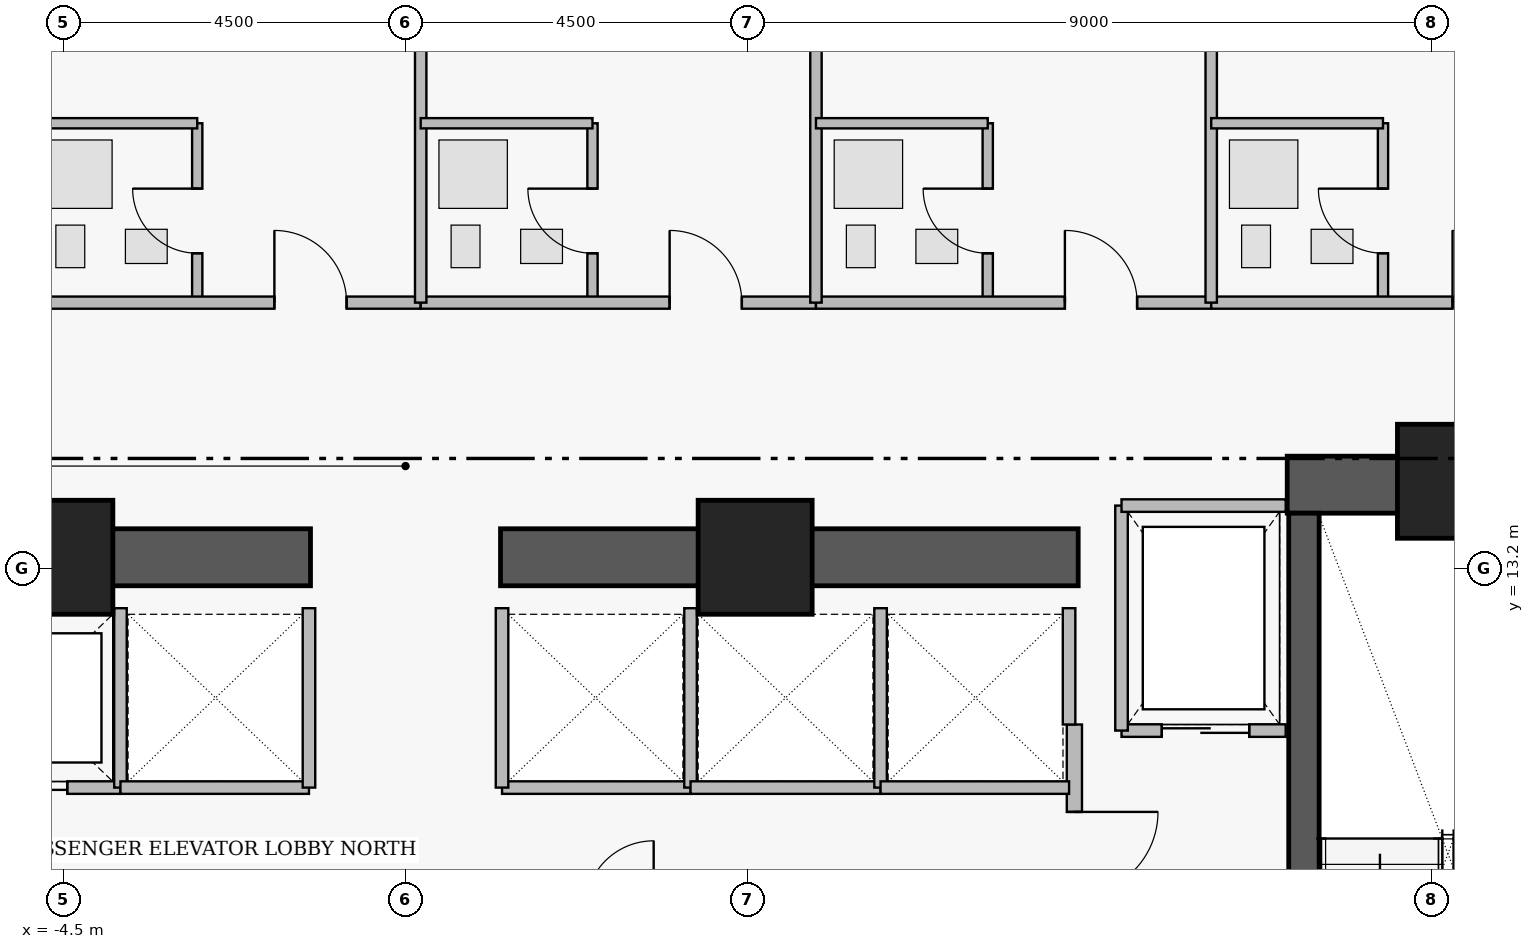
"""IFC4 building model, lengths in metres.
Left out: names, types, materials, properties, quantities, classifications, styles, units other than length and angle.
Written with IfcOpenShell. Run it as: python <this file> out.ifc"""

import sys

from ifc_helpers import new_model, si_unit, direction, frame, frame_2d, origin, origin_2d, place, context, subcontext, project, spatial, rectangle, extrude, element, fill, save


model = new_model("IFC4")
c1 = context("Model", 3, precision=1e-05, world=origin(), true_north=direction((0.0, 1.0)))
c2 = subcontext(c1, "Body", "Model", "MODEL_VIEW")
j1 = project(units=[si_unit("LENGTHUNIT", "METRE"), si_unit("PLANEANGLEUNIT", "RADIAN")], contexts=[c1])
p1 = place(None, origin())
s1 = spatial("IfcSite", under=j1, at=p1, CompositionType="ELEMENT")
p2 = place(p1, origin())
s2 = spatial("IfcBuilding", under=s1, at=p2, CompositionType="ELEMENT")
p3 = place(p2, frame((0.0, 0.0, 106.6)))
s3 = spatial("IfcBuildingStorey", under=s2, at=p3, CompositionType="ELEMENT", Elevation=106.6)
p4 = place(p3, frame((11.6, 14.305, 0.0), z_axis=(0.0, 0.0, 1.0), x_axis=(1.0, 0.0, 0.0)))
e1 = element("IfcWall", 1, at=p4, inside=s3, PredefinedType="SHEAR", context=c2, shape_type="SweptSolid", body=[
    extrude(rectangle(XDim=4.56, YDim=0.75, at=frame_2d((2.28, 0.0))), origin(), (0.0, 0.0, 1.0), 3.46),
])
for number, where, z_axis, x_axis in (
    (2, (-8.85, 13.35, 0.0), (0.0, 0.0, 1.0), (1.0, 0.0, 0.0)),
    (3, (1.25, 13.35, 0.0), (0.0, 0.0, 1.0), (1.0, 0.0, 0.0)),
):
    element("IfcWall", number, at=place(p3, frame(where, z_axis=z_axis, x_axis=x_axis)), inside=s3, PredefinedType="SHEAR", context=c2, shape_type="SweptSolid", body=[
        extrude(rectangle(XDim=7.6, YDim=0.75, at=frame_2d((3.8, 0.0))), origin(), (0.0, 0.0, 1.0), 3.43),
    ])
p5 = place(p3, frame((11.82, 13.93, 0.0), z_axis=(0.0, 0.0, 1.0), x_axis=(0.0, -1.0, 0.0)))
e4 = element("IfcWall", 4, at=p5, inside=s3, PredefinedType="SHEAR", context=c2, shape_type="SweptSolid", body=[
    extrude(rectangle(XDim=8.96, YDim=0.4, at=frame_2d((4.48, 0.0))), origin(), (0.0, 0.0, 1.0), 3.46),
])
p6 = place(p5, frame((7.53, 0.0, 0.0)))
e5 = element("IfcOpeningElement", 5, at=p6, cuts=e4, PredefinedType="OPENING", context=c2, shape_type="SweptSolid", body=[
    extrude(rectangle(XDim=1.12, YDim=2.22, at=frame_2d((0.56, 1.11))), frame((0.0, 0.21, 0.0), z_axis=(0.0, -1.0, 0.0), x_axis=(1.0, 0.0, 0.0)), (0.0, 0.0, 1.0), 0.42),
])
for number, where, z_axis, x_axis in (
    (6, (-4.6, 13.35, 0.0), (0.0, 0.0, 1.0), (1.0, 0.0, 0.0)),
    (7, (4.6, 13.35, 0.0), (0.0, 0.0, 1.0), (1.0, 0.0, 0.0)),
    (8, (13.8, 14.35, 0.0), (0.0, 0.0, 1.0), (1.0, 0.0, 0.0)),
):
    element("IfcColumn", number, at=place(p3, frame(where, z_axis=z_axis, x_axis=x_axis)), inside=s3, PredefinedType="COLUMN", context=c2, shape_type="SweptSolid", body=[
        extrude(rectangle(XDim=1.5, YDim=1.5, at=origin_2d()), origin(), (0.0, 0.0, 1.0), 3.65),
    ])
p7 = place(p3, frame((8.8, 11.15, 0.0), z_axis=(0.0, 0.0, 1.0), x_axis=(0.0, -1.0, 0.0)))
e9 = element("IfcWall", 9, at=p7, inside=s3, PredefinedType="PARTITIONING", context=c2, shape_type="SweptSolid", body=[
    extrude(rectangle(XDim=6.1, YDim=0.2, at=frame_2d((3.05, 0.0))), origin(), (0.0, 0.0, 1.0), 3.43),
])
p8 = place(p7, frame((1.15, 0.0, 0.0)))
e10 = element("IfcOpeningElement", 10, at=p8, cuts=e9, PredefinedType="OPENING", context=c2, shape_type="SweptSolid", body=[
    extrude(rectangle(XDim=1.1, YDim=2.2, at=frame_2d((0.55, 1.1))), frame((0.0, 0.11, 0.0), z_axis=(0.0, -1.0, 0.0), x_axis=(1.0, 0.0, 0.0)), (0.0, 0.0, 1.0), 0.22),
])
p9 = place(p7, frame((4.75, 0.0, 0.0)))
e11 = element("IfcOpeningElement", 11, at=p9, cuts=e9, PredefinedType="OPENING", context=c2, shape_type="SweptSolid", body=[
    extrude(rectangle(XDim=1.1, YDim=2.2, at=frame_2d((0.55, 1.1))), frame((0.0, 0.11, 0.0), z_axis=(0.0, -1.0, 0.0), x_axis=(1.0, 0.0, 0.0)), (0.0, 0.0, 1.0), 0.22),
])
p10 = place(p3, frame((9.42, 11.07, 0.0), z_axis=(0.0, 0.0, 1.0), x_axis=(1.0, 0.0, 0.0)))
e12 = element("IfcWall", 12, at=p10, inside=s3, PredefinedType="PARTITIONING", context=c2, shape_type="SweptSolid", body=[
    extrude(rectangle(XDim=2.16, YDim=0.165, at=frame_2d((1.08, 0.0))), origin(), (0.0, 0.0, 1.0), 3.43),
])
p11 = place(p10, frame((0.53, 0.0, 0.0)))
e13 = element("IfcOpeningElement", 13, at=p11, cuts=e12, PredefinedType="OPENING", context=c2, shape_type="SweptSolid", body=[
    extrude(rectangle(XDim=1.15, YDim=2.25, at=frame_2d((0.575, 1.125))), frame((0.0, 0.093, 0.0), z_axis=(0.0, -1.0, 0.0), x_axis=(1.0, 0.0, 0.0)), (0.0, 0.0, 1.0), 0.185),
])
p12 = place(p3, frame((-6.25, 10.32, 0.0), z_axis=(0.0, 0.0, 1.0), x_axis=(1.0, 0.0, 0.0)))
e14 = element("IfcWall", 14, at=p12, inside=s3, PredefinedType="PARTITIONING", context=c2, shape_type="SweptSolid", body=[
    extrude(rectangle(XDim=2.5, YDim=0.165, at=frame_2d((1.25, 0.0))), origin(), (0.0, 0.0, 1.0), 3.43),
])
p13 = place(p12, frame((0.7, 0.0, 0.0)))
e15 = element("IfcOpeningElement", 15, at=p13, cuts=e14, PredefinedType="OPENING", context=c2, shape_type="SweptSolid", body=[
    extrude(rectangle(XDim=1.1, YDim=2.25, at=frame_2d((0.55, 1.125))), frame((0.0, 0.093, 0.0), z_axis=(0.0, -1.0, 0.0), x_axis=(1.0, 0.0, 0.0)), (0.0, 0.0, 1.0), 0.185),
])
p14 = place(p3, frame((-2.74, 16.7, 0.0), z_axis=(0.0, 0.0, 1.0), x_axis=(0.0, 1.0, 0.0)))
e16 = element("IfcWall", 16, at=p14, inside=s3, PredefinedType="PLUMBINGWALL", context=c2, shape_type="SweptSolid", body=[
    extrude(rectangle(XDim=2.36, YDim=0.135, at=frame_2d((1.18, 0.0))), origin(), (0.0, 0.0, 1.0), 3.43),
])
p15 = place(p14, frame((0.65, 0.0, 0.0)))
e17 = element("IfcOpeningElement", 17, at=p15, cuts=e16, PredefinedType="OPENING", context=c2, shape_type="SweptSolid", body=[
    extrude(rectangle(XDim=0.85, YDim=2.1, at=frame_2d((0.425, 1.05))), frame((0.0, 0.077, 0.0), z_axis=(0.0, -1.0, 0.0), x_axis=(1.0, 0.0, 0.0)), (0.0, 0.0, 1.0), 0.155),
])
p16 = place(p3, frame((-5.0, 16.7, 0.0), z_axis=(0.0, 0.0, 1.0), x_axis=(1.0, 0.0, 0.0)))
e18 = element("IfcWall", 18, at=p16, inside=s3, PredefinedType="PARTITIONING", context=c2, shape_type="SweptSolid", body=[
    extrude(rectangle(XDim=5.2, YDim=0.16, at=frame_2d((2.6, 0.0))), origin(), (0.0, 0.0, 1.0), 2.973),
])
p17 = place(p16, frame((3.275, 0.0, 0.0)))
e19 = element("IfcOpeningElement", 19, at=p17, cuts=e18, PredefinedType="OPENING", context=c2, shape_type="SweptSolid", body=[
    extrude(rectangle(XDim=0.95, YDim=2.15, at=frame_2d((0.475, 1.075))), frame((0.0, 0.09, 0.0), z_axis=(0.0, -1.0, 0.0), x_axis=(1.0, 0.0, 0.0)), (0.0, 0.0, 1.0), 0.18),
])
p18 = place(p3, frame((2.46, 16.7, 0.0), z_axis=(0.0, 0.0, 1.0), x_axis=(0.0, 1.0, 0.0)))
e20 = element("IfcWall", 20, at=p18, inside=s3, PredefinedType="PLUMBINGWALL", context=c2, shape_type="SweptSolid", body=[
    extrude(rectangle(XDim=2.36, YDim=0.135, at=frame_2d((1.18, 0.0))), origin(), (0.0, 0.0, 1.0), 3.43),
])
p19 = place(p18, frame((0.65, 0.0, 0.0)))
e21 = element("IfcOpeningElement", 21, at=p19, cuts=e20, PredefinedType="OPENING", context=c2, shape_type="SweptSolid", body=[
    extrude(rectangle(XDim=0.85, YDim=2.1, at=frame_2d((0.425, 1.05))), frame((0.0, 0.077, 0.0), z_axis=(0.0, -1.0, 0.0), x_axis=(1.0, 0.0, 0.0)), (0.0, 0.0, 1.0), 0.155),
])
p20 = place(p3, frame((0.2, 16.7, 0.0), z_axis=(0.0, 0.0, 1.0), x_axis=(1.0, 0.0, 0.0)))
e22 = element("IfcWall", 22, at=p20, inside=s3, PredefinedType="PARTITIONING", context=c2, shape_type="SweptSolid", body=[
    extrude(rectangle(XDim=5.2, YDim=0.16, at=frame_2d((2.6, 0.0))), origin(), (0.0, 0.0, 1.0), 2.973),
])
p21 = place(p20, frame((3.275, 0.0, 0.0)))
e23 = element("IfcOpeningElement", 23, at=p21, cuts=e22, PredefinedType="OPENING", context=c2, shape_type="SweptSolid", body=[
    extrude(rectangle(XDim=0.95, YDim=2.15, at=frame_2d((0.475, 1.075))), frame((0.0, 0.09, 0.0), z_axis=(0.0, -1.0, 0.0), x_axis=(1.0, 0.0, 0.0)), (0.0, 0.0, 1.0), 0.18),
])
p22 = place(p3, frame((7.66, 16.7, 0.0), z_axis=(0.0, 0.0, 1.0), x_axis=(0.0, 1.0, 0.0)))
e24 = element("IfcWall", 24, at=p22, inside=s3, PredefinedType="PLUMBINGWALL", context=c2, shape_type="SweptSolid", body=[
    extrude(rectangle(XDim=2.36, YDim=0.135, at=frame_2d((1.18, 0.0))), origin(), (0.0, 0.0, 1.0), 3.43),
])
p23 = place(p22, frame((0.65, 0.0, 0.0)))
e25 = element("IfcOpeningElement", 25, at=p23, cuts=e24, PredefinedType="OPENING", context=c2, shape_type="SweptSolid", body=[
    extrude(rectangle(XDim=0.85, YDim=2.1, at=frame_2d((0.425, 1.05))), frame((0.0, 0.077, 0.0), z_axis=(0.0, -1.0, 0.0), x_axis=(1.0, 0.0, 0.0)), (0.0, 0.0, 1.0), 0.155),
])
p24 = place(p3, frame((5.4, 16.7, 0.0), z_axis=(0.0, 0.0, 1.0), x_axis=(1.0, 0.0, 0.0)))
e26 = element("IfcWall", 26, at=p24, inside=s3, PredefinedType="PARTITIONING", context=c2, shape_type="SweptSolid", body=[
    extrude(rectangle(XDim=5.2, YDim=0.16, at=frame_2d((2.6, 0.0))), origin(), (0.0, 0.0, 1.0), 2.973),
])
p25 = place(p24, frame((3.275, 0.0, 0.0)))
e27 = element("IfcOpeningElement", 27, at=p25, cuts=e26, PredefinedType="OPENING", context=c2, shape_type="SweptSolid", body=[
    extrude(rectangle(XDim=0.95, YDim=2.15, at=frame_2d((0.475, 1.075))), frame((0.0, 0.09, 0.0), z_axis=(0.0, -1.0, 0.0), x_axis=(1.0, 0.0, 0.0)), (0.0, 0.0, 1.0), 0.18),
])
p26 = place(p3, frame((12.86, 16.7, 0.0), z_axis=(0.0, 0.0, 1.0), x_axis=(0.0, 1.0, 0.0)))
e28 = element("IfcWall", 28, at=p26, inside=s3, PredefinedType="PLUMBINGWALL", context=c2, shape_type="SweptSolid", body=[
    extrude(rectangle(XDim=2.36, YDim=0.135, at=frame_2d((1.18, 0.0))), origin(), (0.0, 0.0, 1.0), 3.43),
])
p27 = place(p26, frame((0.65, 0.0, 0.0)))
e29 = element("IfcOpeningElement", 29, at=p27, cuts=e28, PredefinedType="OPENING", context=c2, shape_type="SweptSolid", body=[
    extrude(rectangle(XDim=0.85, YDim=2.1, at=frame_2d((0.425, 1.05))), frame((0.0, 0.077, 0.0), z_axis=(0.0, -1.0, 0.0), x_axis=(1.0, 0.0, 0.0)), (0.0, 0.0, 1.0), 0.155),
])
p28 = place(p3, frame((10.6, 16.7, 0.0), z_axis=(0.0, 0.0, 1.0), x_axis=(1.0, 0.0, 0.0)))
e30 = element("IfcWall", 30, at=p28, inside=s3, PredefinedType="PARTITIONING", context=c2, shape_type="SweptSolid", body=[
    extrude(rectangle(XDim=5.0, YDim=0.16, at=frame_2d((2.5, 0.0))), origin(), (0.0, 0.0, 1.0), 2.973),
])
p29 = place(p28, frame((3.175, 0.0, 0.0)))
e31 = element("IfcOpeningElement", 31, at=p29, cuts=e30, PredefinedType="OPENING", context=c2, shape_type="SweptSolid", body=[
    extrude(rectangle(XDim=0.95, YDim=2.15, at=frame_2d((0.475, 1.075))), frame((0.0, 0.09, 0.0), z_axis=(0.0, -1.0, 0.0), x_axis=(1.0, 0.0, 0.0)), (0.0, 0.0, 1.0), 0.18),
])
p30 = place(p3, frame((9.42, 11.07, 0.0), z_axis=(0.0, 0.0, 1.0), x_axis=(0.0, 1.0, 0.0)))
e32 = element("IfcWall", 32, at=p30, inside=s3, PredefinedType="PARTITIONING", context=c2, shape_type="SweptSolid", body=[
    extrude(rectangle(XDim=2.96, YDim=0.165, at=frame_2d((1.48, 0.0))), origin(), (0.0, 0.0, 1.0), 3.43),
])
p31 = place(p3, frame((9.42, 14.03, 0.0), z_axis=(0.0, 0.0, 1.0), x_axis=(1.0, 0.0, 0.0)))
e33 = element("IfcWall", 33, at=p31, inside=s3, PredefinedType="PARTITIONING", context=c2, shape_type="SweptSolid", body=[
    extrude(rectangle(XDim=2.16, YDim=0.165, at=frame_2d((1.08, 0.0))), origin(), (0.0, 0.0, 1.0), 3.43),
])
p32 = place(p3, frame((-3.75, 10.32, 0.0), z_axis=(0.0, 0.0, 1.0), x_axis=(0.0, 1.0, 0.0)))
e34 = element("IfcWall", 34, at=p32, inside=s3, PredefinedType="PARTITIONING", context=c2, shape_type="SweptSolid", body=[
    extrude(rectangle(XDim=2.36, YDim=0.165, at=frame_2d((1.18, 0.0))), origin(), (0.0, 0.0, 1.0), 3.43),
])
p33 = place(p3, frame((-3.75, 10.32, 0.0), z_axis=(0.0, 0.0, 1.0), x_axis=(1.0, 0.0, 0.0)))
e35 = element("IfcWall", 35, at=p33, inside=s3, PredefinedType="PARTITIONING", context=c2, shape_type="SweptSolid", body=[
    extrude(rectangle(XDim=2.48, YDim=0.165, at=frame_2d((1.24, 0.0))), origin(), (0.0, 0.0, 1.0), 3.43),
])
p34 = place(p3, frame((-1.27, 10.32, 0.0), z_axis=(0.0, 0.0, 1.0), x_axis=(0.0, 1.0, 0.0)))
e36 = element("IfcWall", 36, at=p34, inside=s3, PredefinedType="PARTITIONING", context=c2, shape_type="SweptSolid", body=[
    extrude(rectangle(XDim=2.36, YDim=0.165, at=frame_2d((1.18, 0.0))), origin(), (0.0, 0.0, 1.0), 3.43),
])
p35 = place(p3, frame((1.27, 10.32, 0.0), z_axis=(0.0, 0.0, 1.0), x_axis=(1.0, 0.0, 0.0)))
e37 = element("IfcWall", 37, at=p35, inside=s3, PredefinedType="PARTITIONING", context=c2, shape_type="SweptSolid", body=[
    extrude(rectangle(XDim=2.48, YDim=0.165, at=frame_2d((1.24, 0.0))), origin(), (0.0, 0.0, 1.0), 3.43),
])
for number, where, z_axis, x_axis in (
    (38, (1.27, 10.32, 0.0), (0.0, 0.0, 1.0), (0.0, 1.0, 0.0)),
    (39, (3.75, 10.32, 0.0), (0.0, 0.0, 1.0), (0.0, 1.0, 0.0)),
):
    element("IfcWall", number, at=place(p3, frame(where, z_axis=z_axis, x_axis=x_axis)), inside=s3, PredefinedType="PARTITIONING", context=c2, shape_type="SweptSolid", body=[
        extrude(rectangle(XDim=2.36, YDim=0.165, at=frame_2d((1.18, 0.0))), origin(), (0.0, 0.0, 1.0), 3.43),
    ])
p36 = place(p3, frame((3.75, 10.32, 0.0), z_axis=(0.0, 0.0, 1.0), x_axis=(1.0, 0.0, 0.0)))
e40 = element("IfcWall", 40, at=p36, inside=s3, PredefinedType="PARTITIONING", context=c2, shape_type="SweptSolid", body=[
    extrude(rectangle(XDim=2.5, YDim=0.165, at=frame_2d((1.25, 0.0))), origin(), (0.0, 0.0, 1.0), 3.43),
])
p37 = place(p3, frame((6.25, 10.32, 0.0), z_axis=(0.0, 0.0, 1.0), x_axis=(0.0, 1.0, 0.0)))
e41 = element("IfcWall", 41, at=p37, inside=s3, PredefinedType="PARTITIONING", context=c2, shape_type="SweptSolid", body=[
    extrude(rectangle(XDim=2.36, YDim=0.165, at=frame_2d((1.18, 0.0))), origin(), (0.0, 0.0, 1.0), 3.43),
])
p38 = place(p3, frame((6.25, 10.32, 0.0), z_axis=(0.0, 0.0, 1.0), x_axis=(1.0, 0.0, 0.0)))
e42 = element("IfcWall", 42, at=p38, inside=s3, PredefinedType="PARTITIONING", context=c2, shape_type="SweptSolid", body=[
    extrude(rectangle(XDim=2.48, YDim=0.165, at=frame_2d((1.24, 0.0))), origin(), (0.0, 0.0, 1.0), 3.43),
])
p39 = place(p3, frame((8.73, 11.15, 0.0), z_axis=(0.0, 0.0, 1.0), x_axis=(0.0, 1.0, 0.0)))
e43 = element("IfcWall", 43, at=p39, inside=s3, PredefinedType="PARTITIONING", context=c2, shape_type="SweptSolid", body=[
    extrude(rectangle(XDim=1.53, YDim=0.165, at=frame_2d((0.765, 0.0))), origin(), (0.0, 0.0, 1.0), 3.43),
])
p40 = place(p3, frame((-5.0, 19.06, 0.0), z_axis=(0.0, 0.0, 1.0), x_axis=(1.0, 0.0, 0.0)))
e44 = element("IfcWall", 44, at=p40, inside=s3, PredefinedType="PLUMBINGWALL", context=c2, shape_type="SweptSolid", body=[
    extrude(rectangle(XDim=2.26, YDim=0.135, at=frame_2d((1.13, 0.0))), origin(), (0.0, 0.0, 1.0), 2.973),
])
p41 = place(p3, frame((0.2, 16.7, 0.0), z_axis=(0.0, 0.0, 1.0), x_axis=(0.0, 1.0, 0.0)))
e45 = element("IfcWall", 45, at=p41, inside=s3, PredefinedType="PARTITIONING", context=c2, shape_type="SweptSolid", body=[
    extrude(rectangle(XDim=11.62, YDim=0.15, at=frame_2d((5.81, 0.0))), origin(), (0.0, 0.0, 1.0), 3.43),
])
p42 = place(p3, frame((0.2, 19.06, 0.0), z_axis=(0.0, 0.0, 1.0), x_axis=(1.0, 0.0, 0.0)))
e46 = element("IfcWall", 46, at=p42, inside=s3, PredefinedType="PLUMBINGWALL", context=c2, shape_type="SweptSolid", body=[
    extrude(rectangle(XDim=2.26, YDim=0.135, at=frame_2d((1.13, 0.0))), origin(), (0.0, 0.0, 1.0), 2.973),
])
p43 = place(p3, frame((5.4, 16.7, 0.0), z_axis=(0.0, 0.0, 1.0), x_axis=(0.0, 1.0, 0.0)))
e47 = element("IfcWall", 47, at=p43, inside=s3, PredefinedType="PARTITIONING", context=c2, shape_type="SweptSolid", body=[
    extrude(rectangle(XDim=11.62, YDim=0.15, at=frame_2d((5.81, 0.0))), origin(), (0.0, 0.0, 1.0), 3.43),
])
p44 = place(p3, frame((5.4, 19.06, 0.0), z_axis=(0.0, 0.0, 1.0), x_axis=(1.0, 0.0, 0.0)))
e48 = element("IfcWall", 48, at=p44, inside=s3, PredefinedType="PLUMBINGWALL", context=c2, shape_type="SweptSolid", body=[
    extrude(rectangle(XDim=2.26, YDim=0.135, at=frame_2d((1.13, 0.0))), origin(), (0.0, 0.0, 1.0), 2.973),
])
p45 = place(p3, frame((10.6, 16.7, 0.0), z_axis=(0.0, 0.0, 1.0), x_axis=(0.0, 1.0, 0.0)))
e49 = element("IfcWall", 49, at=p45, inside=s3, PredefinedType="PARTITIONING", context=c2, shape_type="SweptSolid", body=[
    extrude(rectangle(XDim=11.62, YDim=0.15, at=frame_2d((5.81, 0.0))), origin(), (0.0, 0.0, 1.0), 3.43),
])
p46 = place(p3, frame((10.6, 19.06, 0.0), z_axis=(0.0, 0.0, 1.0), x_axis=(1.0, 0.0, 0.0)))
e50 = element("IfcWall", 50, at=p46, inside=s3, PredefinedType="PLUMBINGWALL", context=c2, shape_type="SweptSolid", body=[
    extrude(rectangle(XDim=2.26, YDim=0.135, at=frame_2d((1.13, 0.0))), origin(), (0.0, 0.0, 1.0), 2.973),
])
p47 = place(p8, origin())
e51 = element("IfcDoor", 51, at=p47, inside=s3, OperationType="SINGLE_SWING_LEFT", PredefinedType="DOOR", context=c2, shape_type="SweptSolid", body=[
    extrude(rectangle(XDim=1.1, YDim=2.2, at=frame_2d((0.55, 1.1))), frame((0.0, 0.025, 0.0), z_axis=(0.0, -1.0, 0.0), x_axis=(1.0, 0.0, 0.0)), (0.0, 0.0, 1.0), 0.05),
])
fill(e10, e51)
p48 = place(p11, origin())
e52 = element("IfcDoor", 52, at=p48, inside=s3, OperationType="SLIDING_TO_LEFT", PredefinedType="DOOR", context=c2, shape_type="SweptSolid", body=[
    extrude(rectangle(XDim=1.15, YDim=2.25, at=frame_2d((0.575, 1.125))), frame((0.0, 0.025, 0.0), z_axis=(0.0, -1.0, 0.0), x_axis=(1.0, 0.0, 0.0)), (0.0, 0.0, 1.0), 0.05),
])
fill(e13, e52)
p49 = place(p13, origin())
e53 = element("IfcDoor", 53, at=p49, inside=s3, OperationType="SLIDING_TO_LEFT", PredefinedType="DOOR", context=c2, shape_type="SweptSolid", body=[
    extrude(rectangle(XDim=1.1, YDim=2.25, at=frame_2d((0.55, 1.125))), frame((0.0, 0.025, 0.0), z_axis=(0.0, -1.0, 0.0), x_axis=(1.0, 0.0, 0.0)), (0.0, 0.0, 1.0), 0.05),
])
fill(e15, e53)
p50 = place(p15, origin())
e54 = element("IfcDoor", 54, at=p50, inside=s3, OperationType="SINGLE_SWING_RIGHT", PredefinedType="DOOR", context=c2, shape_type="SweptSolid", body=[
    extrude(rectangle(XDim=0.85, YDim=2.1, at=frame_2d((0.425, 1.05))), frame((0.0, 0.025, 0.0), z_axis=(0.0, -1.0, 0.0), x_axis=(1.0, 0.0, 0.0)), (0.0, 0.0, 1.0), 0.05),
])
fill(e17, e54)
p51 = place(p17, origin())
e55 = element("IfcDoor", 55, at=p51, inside=s3, OperationType="SINGLE_SWING_LEFT", PredefinedType="DOOR", context=c2, shape_type="SweptSolid", body=[
    extrude(rectangle(XDim=0.95, YDim=2.15, at=frame_2d((0.475, 1.075))), frame((0.0, 0.025, 0.0), z_axis=(0.0, -1.0, 0.0), x_axis=(1.0, 0.0, 0.0)), (0.0, 0.0, 1.0), 0.05),
])
fill(e19, e55)
p52 = place(p19, origin())
e56 = element("IfcDoor", 56, at=p52, inside=s3, OperationType="SINGLE_SWING_RIGHT", PredefinedType="DOOR", context=c2, shape_type="SweptSolid", body=[
    extrude(rectangle(XDim=0.85, YDim=2.1, at=frame_2d((0.425, 1.05))), frame((0.0, 0.025, 0.0), z_axis=(0.0, -1.0, 0.0), x_axis=(1.0, 0.0, 0.0)), (0.0, 0.0, 1.0), 0.05),
])
fill(e21, e56)
p53 = place(p21, origin())
e57 = element("IfcDoor", 57, at=p53, inside=s3, OperationType="SINGLE_SWING_LEFT", PredefinedType="DOOR", context=c2, shape_type="SweptSolid", body=[
    extrude(rectangle(XDim=0.95, YDim=2.15, at=frame_2d((0.475, 1.075))), frame((0.0, 0.025, 0.0), z_axis=(0.0, -1.0, 0.0), x_axis=(1.0, 0.0, 0.0)), (0.0, 0.0, 1.0), 0.05),
])
fill(e23, e57)
p54 = place(p23, origin())
e58 = element("IfcDoor", 58, at=p54, inside=s3, OperationType="SINGLE_SWING_RIGHT", PredefinedType="DOOR", context=c2, shape_type="SweptSolid", body=[
    extrude(rectangle(XDim=0.85, YDim=2.1, at=frame_2d((0.425, 1.05))), frame((0.0, 0.025, 0.0), z_axis=(0.0, -1.0, 0.0), x_axis=(1.0, 0.0, 0.0)), (0.0, 0.0, 1.0), 0.05),
])
fill(e25, e58)
p55 = place(p25, origin())
e59 = element("IfcDoor", 59, at=p55, inside=s3, OperationType="SINGLE_SWING_LEFT", PredefinedType="DOOR", context=c2, shape_type="SweptSolid", body=[
    extrude(rectangle(XDim=0.95, YDim=2.15, at=frame_2d((0.475, 1.075))), frame((0.0, 0.025, 0.0), z_axis=(0.0, -1.0, 0.0), x_axis=(1.0, 0.0, 0.0)), (0.0, 0.0, 1.0), 0.05),
])
fill(e27, e59)
p56 = place(p27, origin())
e60 = element("IfcDoor", 60, at=p56, inside=s3, OperationType="SINGLE_SWING_RIGHT", PredefinedType="DOOR", context=c2, shape_type="SweptSolid", body=[
    extrude(rectangle(XDim=0.85, YDim=2.1, at=frame_2d((0.425, 1.05))), frame((0.0, 0.025, 0.0), z_axis=(0.0, -1.0, 0.0), x_axis=(1.0, 0.0, 0.0)), (0.0, 0.0, 1.0), 0.05),
])
fill(e29, e60)
p57 = place(p29, origin())
e61 = element("IfcDoor", 61, at=p57, inside=s3, OperationType="SINGLE_SWING_LEFT", PredefinedType="DOOR", context=c2, shape_type="SweptSolid", body=[
    extrude(rectangle(XDim=0.95, YDim=2.15, at=frame_2d((0.475, 1.075))), frame((0.0, 0.025, 0.0), z_axis=(0.0, -1.0, 0.0), x_axis=(1.0, 0.0, 0.0)), (0.0, 0.0, 1.0), 0.05),
])
fill(e31, e61)
save(model, sys.argv[1])
